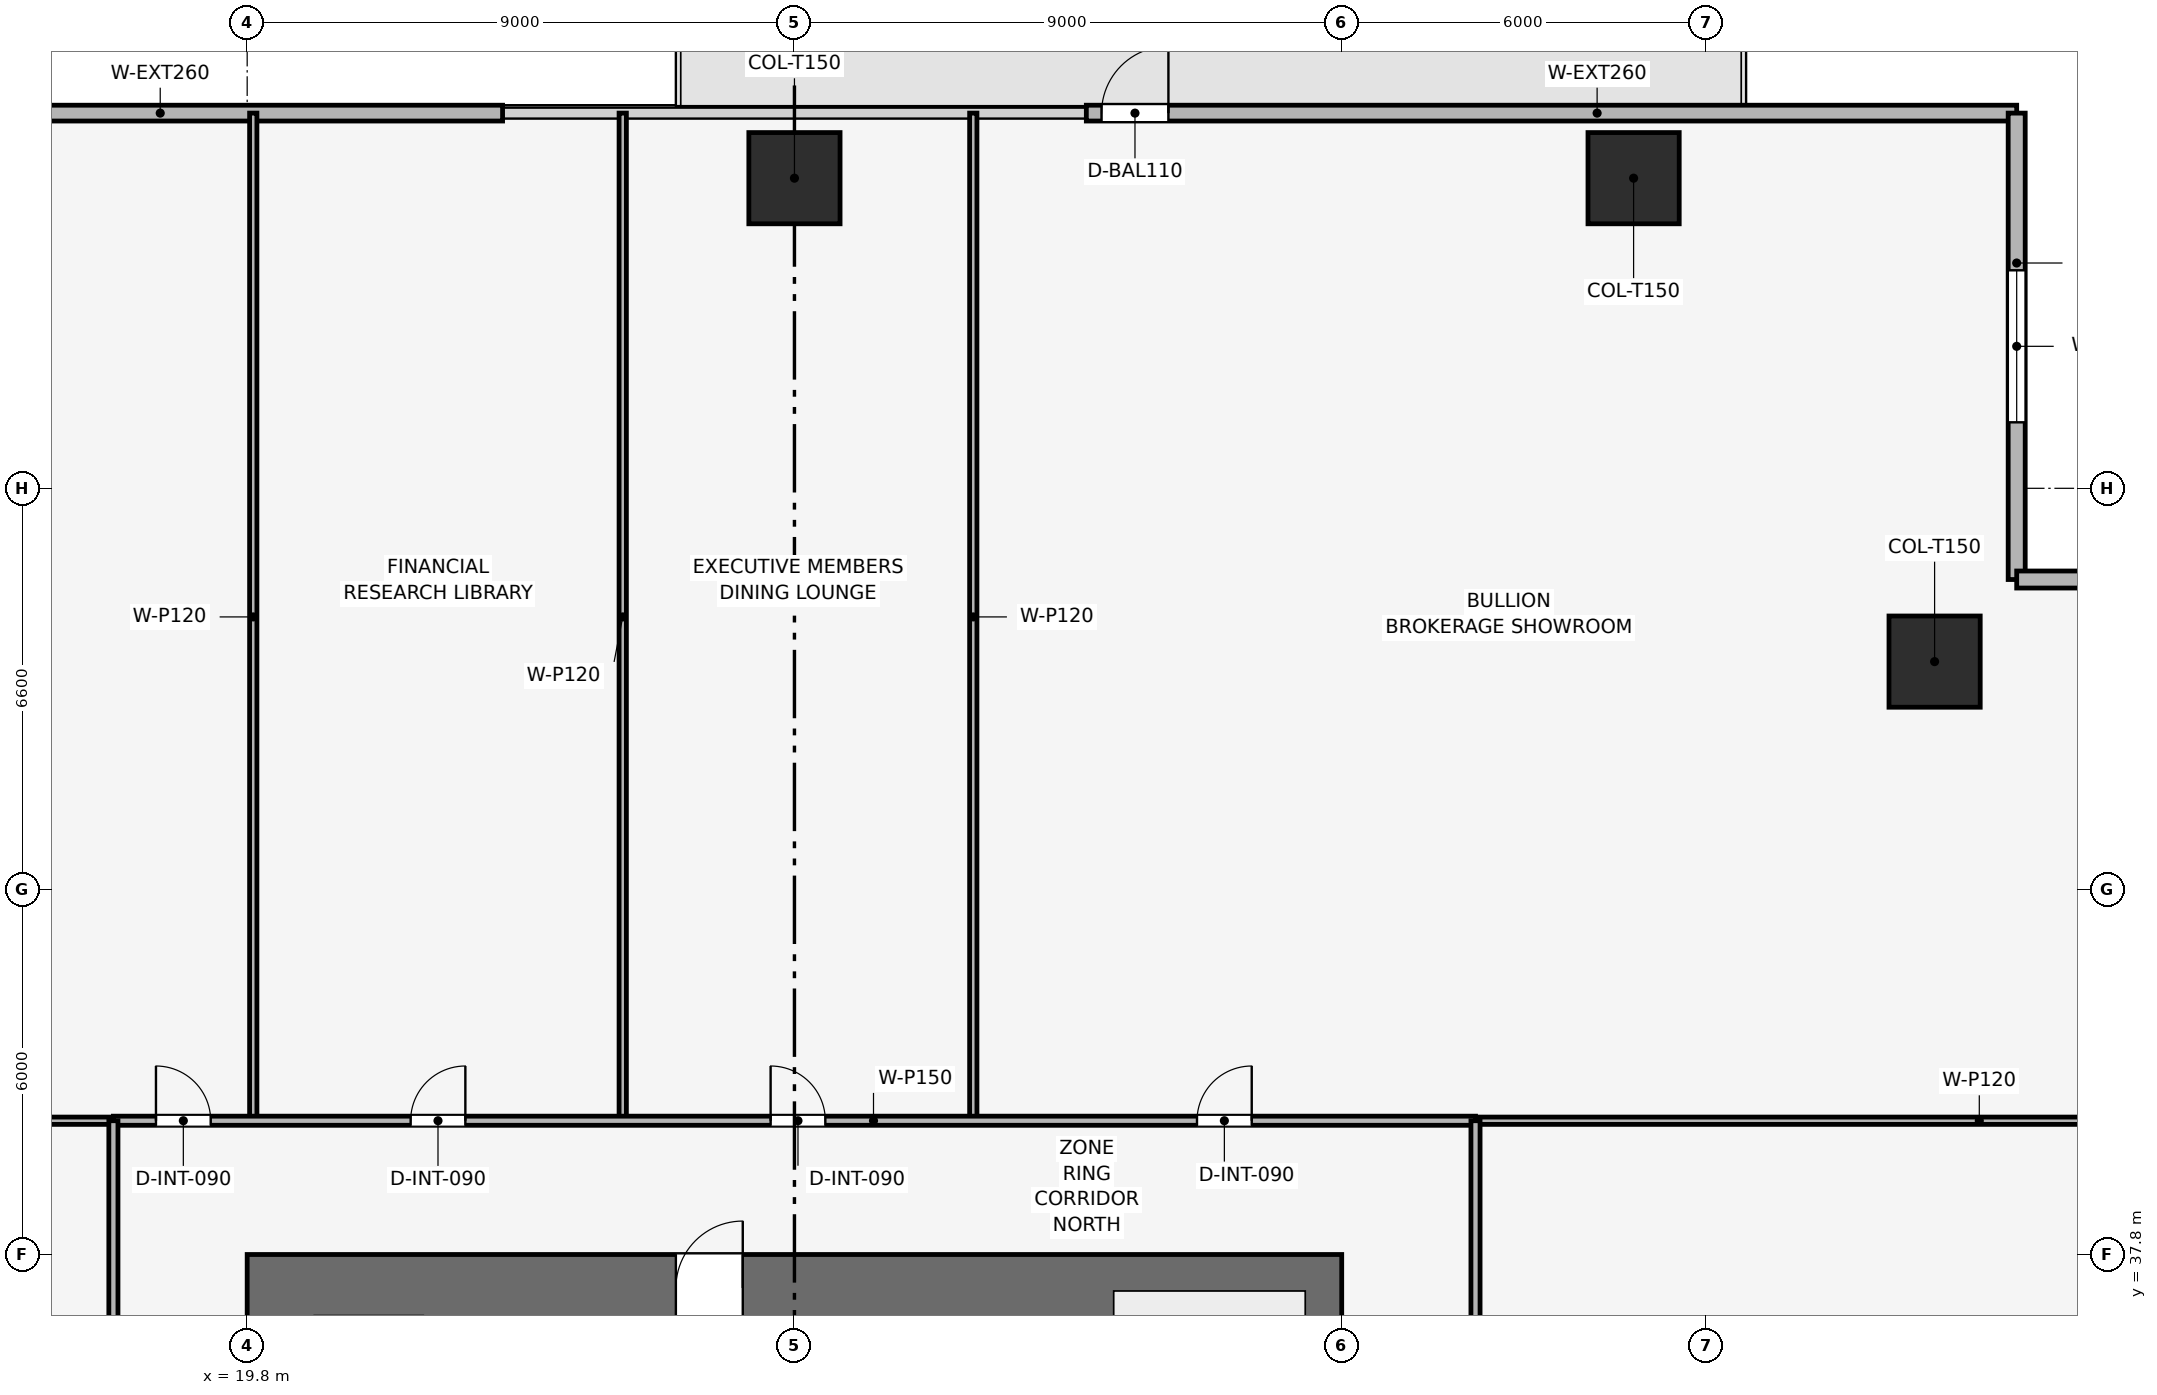
"""IFC4 building model, lengths in metres.
Left out: names, types, materials, properties, quantities, classifications, styles, units other than length and angle.
Written with IfcOpenShell. Run it as: python <this file> out.ifc"""

import sys

from ifc_helpers import new_model, si_unit, direction, frame, frame_2d, origin, origin_2d, place, context, subcontext, project, spatial, rectangle, extrude, element, fill, save


model = new_model("IFC4")
c1 = context("Model", 3, precision=1e-05, world=origin(), true_north=direction((0.0, 1.0)))
c2 = subcontext(c1, "Body", "Model", "MODEL_VIEW")
j1 = project(units=[si_unit("LENGTHUNIT", "METRE"), si_unit("PLANEANGLEUNIT", "RADIAN")], contexts=[c1])
p1 = place(None, origin())
s1 = spatial("IfcSite", under=j1, at=p1, CompositionType="ELEMENT")
p2 = place(p1, origin())
s2 = spatial("IfcBuilding", under=s1, at=p2, CompositionType="ELEMENT")
p3 = place(p2, frame((0.0, 0.0, 88.5)))
s3 = spatial("IfcBuildingStorey", under=s2, at=p3, CompositionType="ELEMENT", Elevation=88.5)
p4 = place(p3, frame((19.8, 37.25, 0.0), z_axis=(0.0, 0.0, 1.0), x_axis=(1.0, 0.0, 0.0)))
e1 = element("IfcWall", 1, at=p4, inside=s3, PredefinedType="SHEAR", context=c2, shape_type="SweptSolid", body=[
    extrude(rectangle(XDim=18.0, YDim=1.1, at=frame_2d((9.0, 0.0))), origin(), (0.0, 0.0, 1.0), 3.9),
])
p5 = place(p4, frame((7.05, 0.0, 0.0)))
e2 = element("IfcOpeningElement", 2, at=p5, cuts=e1, PredefinedType="OPENING", context=c2, shape_type="SweptSolid", body=[
    extrude(rectangle(XDim=1.1, YDim=2.15, at=frame_2d((0.55, 1.075))), frame((0.0, 0.56, 0.0), z_axis=(0.0, -1.0, 0.0), x_axis=(1.0, 0.0, 0.0)), (0.0, 0.0, 1.0), 1.12),
])
for number, where, z_axis, x_axis in (
    (3, (42.6, 55.5, 0.003), (0.0, 0.0, 1.0), (1.0, 0.0, 0.0)),
    (4, (28.8, 55.5, 0.003), (0.0, 0.0, 1.0), (1.0, 0.0, 0.0)),
    (5, (47.55, 47.55, 0.003), (0.0, 0.0, 1.0), (1.0, 0.0, 0.0)),
):
    element("IfcColumn", number, at=place(p3, frame(where, z_axis=z_axis, x_axis=x_axis)), inside=s3, PredefinedType="COLUMN", context=c2, shape_type="SweptSolid", body=[
        extrude(rectangle(XDim=1.5, YDim=1.5, at=origin_2d()), origin(), (0.0, 0.0, 1.0), 3.644),
    ])
p6 = place(p3, frame((8.7, 56.57, 0.0), z_axis=(0.0, 0.0, 1.0), x_axis=(1.0, 0.0, 0.0)))
e6 = element("IfcWall", 6, at=p6, inside=s3, PredefinedType="SOLIDWALL", context=c2, shape_type="SweptSolid", body=[
    extrude(rectangle(XDim=15.3, YDim=0.26, at=frame_2d((7.65, 0.0))), origin(), (0.0, 0.0, 1.0), 3.65),
])
p7 = place(p6, frame((0.25, 0.0, 0.9)))
e7 = element("IfcOpeningElement", 7, at=p7, cuts=e6, PredefinedType="OPENING", context=c2, shape_type="SweptSolid", body=[
    extrude(rectangle(XDim=3.8, YDim=1.9, at=frame_2d((1.9, 0.95))), frame((0.0, 0.14, 0.0), z_axis=(0.0, -1.0, 0.0), x_axis=(1.0, 0.0, 0.0)), (0.0, 0.0, 1.0), 0.28),
])
p8 = place(p3, frame((33.6, 56.57, 0.0), z_axis=(0.0, 0.0, 1.0), x_axis=(1.0, 0.0, 0.0)))
e8 = element("IfcWall", 8, at=p8, inside=s3, PredefinedType="SOLIDWALL", context=c2, shape_type="SweptSolid", body=[
    extrude(rectangle(XDim=15.3, YDim=0.26, at=frame_2d((7.65, 0.0))), origin(), (0.0, 0.0, 1.0), 3.65),
])
p9 = place(p8, frame((0.25, 0.0, 0.0)))
e9 = element("IfcOpeningElement", 9, at=p9, cuts=e8, PredefinedType="OPENING", context=c2, shape_type="SweptSolid", body=[
    extrude(rectangle(XDim=1.1, YDim=2.2, at=frame_2d((0.55, 1.1))), frame((0.0, 0.14, 0.0), z_axis=(0.0, -1.0, 0.0), x_axis=(1.0, 0.0, 0.0)), (0.0, 0.0, 1.0), 0.28),
])
p10 = place(p3, frame((48.9, 56.57, 0.0), z_axis=(0.0, 0.0, 1.0), x_axis=(0.0, -1.0, 0.0)))
e10 = element("IfcWall", 10, at=p10, inside=s3, PredefinedType="SOLIDWALL", context=c2, shape_type="SweptSolid", body=[
    extrude(rectangle(XDim=7.67, YDim=0.28, at=frame_2d((3.835, 0.0))), origin(), (0.0, 0.0, 1.0), 3.65),
])
p11 = place(p10, frame((2.585, 0.0, 0.9)))
e11 = element("IfcOpeningElement", 11, at=p11, cuts=e10, PredefinedType="OPENING", context=c2, shape_type="SweptSolid", body=[
    extrude(rectangle(XDim=2.5, YDim=1.9, at=frame_2d((1.25, 0.95))), frame((0.0, 0.15, 0.0), z_axis=(0.0, -1.0, 0.0), x_axis=(1.0, 0.0, 0.0)), (0.0, 0.0, 1.0), 0.3),
])
p12 = place(p3, frame((48.9, 48.9, 0.0), z_axis=(0.0, 0.0, 1.0), x_axis=(1.0, 0.0, 0.0)))
e12 = element("IfcWall", 12, at=p12, inside=s3, PredefinedType="SOLIDWALL", context=c2, shape_type="SweptSolid", body=[
    extrude(rectangle(XDim=7.67, YDim=0.28, at=frame_2d((3.835, 0.0))), origin(), (0.0, 0.0, 1.0), 3.65),
])
p13 = place(p12, frame((2.585, 0.0, 0.9)))
e13 = element("IfcOpeningElement", 13, at=p13, cuts=e12, PredefinedType="OPENING", context=c2, shape_type="SweptSolid", body=[
    extrude(rectangle(XDim=2.5, YDim=1.9, at=frame_2d((1.25, 0.95))), frame((0.0, 0.15, 0.0), z_axis=(0.0, -1.0, 0.0), x_axis=(1.0, 0.0, 0.0)), (0.0, 0.0, 1.0), 0.3),
])
for number, where, z_axis, x_axis in (
    (14, (19.9, 40.0, 0.0), (0.0, 0.0, 1.0), (0.0, 1.0, 0.0)),
    (15, (25.976, 40.0, 0.0), (0.0, 0.0, 1.0), (0.0, 1.0, 0.0)),
    (16, (31.741, 40.0, 0.0), (0.0, 0.0, 1.0), (0.0, 1.0, 0.0)),
    (17, (1.03, 40.0, 0.0), (0.0, 0.0, 1.0), (1.0, 0.0, 0.0)),
    (18, (40.0, 40.0, 0.0), (0.0, 0.0, 1.0), (1.0, 0.0, 0.0)),
):
    element("IfcWall", number, at=place(p3, frame(where, z_axis=z_axis, x_axis=x_axis)), inside=s3, PredefinedType="PARTITIONING", context=c2, shape_type="SweptSolid", body=[
        extrude(rectangle(XDim=16.57, YDim=0.12, at=frame_2d((8.285, 0.0))), origin(), (0.0, 0.0, 1.0), 2.935),
    ])
p14 = place(p3, frame((17.6, 40.0, 0.0), z_axis=(0.0, 0.0, 1.0), x_axis=(1.0, 0.0, 0.0)))
e19 = element("IfcWall", 19, at=p14, inside=s3, PredefinedType="PARTITIONING", context=c2, shape_type="SweptSolid", body=[
    extrude(rectangle(XDim=22.4, YDim=0.15, at=frame_2d((11.2, 0.0))), origin(), (0.0, 0.0, 1.0), 3.085),
])
p15 = place(p14, frame((0.7, 0.0, 0.0)))
e20 = element("IfcOpeningElement", 20, at=p15, cuts=e19, PredefinedType="OPENING", context=c2, shape_type="SweptSolid", body=[
    extrude(rectangle(XDim=0.9, YDim=2.1, at=frame_2d((0.45, 1.05))), frame((0.0, 0.085, 0.0), z_axis=(0.0, -1.0, 0.0), x_axis=(1.0, 0.0, 0.0)), (0.0, 0.0, 1.0), 0.17),
])
p16 = place(p14, frame((4.888, 0.0, 0.0)))
e21 = element("IfcOpeningElement", 21, at=p16, cuts=e19, PredefinedType="OPENING", context=c2, shape_type="SweptSolid", body=[
    extrude(rectangle(XDim=0.9, YDim=2.1, at=frame_2d((0.45, 1.05))), frame((0.0, 0.085, 0.0), z_axis=(0.0, -1.0, 0.0), x_axis=(1.0, 0.0, 0.0)), (0.0, 0.0, 1.0), 0.17),
])
p17 = place(p14, frame((10.808, 0.0, 0.0)))
e22 = element("IfcOpeningElement", 22, at=p17, cuts=e19, PredefinedType="OPENING", context=c2, shape_type="SweptSolid", body=[
    extrude(rectangle(XDim=0.9, YDim=2.1, at=frame_2d((0.45, 1.05))), frame((0.0, 0.085, 0.0), z_axis=(0.0, -1.0, 0.0), x_axis=(1.0, 0.0, 0.0)), (0.0, 0.0, 1.0), 0.17),
])
p18 = place(p14, frame((17.82, 0.0, 0.0)))
e23 = element("IfcOpeningElement", 23, at=p18, cuts=e19, PredefinedType="OPENING", context=c2, shape_type="SweptSolid", body=[
    extrude(rectangle(XDim=0.9, YDim=2.1, at=frame_2d((0.45, 1.05))), frame((0.0, 0.085, 0.0), z_axis=(0.0, -1.0, 0.0), x_axis=(1.0, 0.0, 0.0)), (0.0, 0.0, 1.0), 0.17),
])
p19 = place(p3, frame((17.6, 17.6, 0.0), z_axis=(0.0, 0.0, 1.0), x_axis=(0.0, 1.0, 0.0)))
e24 = element("IfcWall", 24, at=p19, inside=s3, PredefinedType="PARTITIONING", context=c2, shape_type="SweptSolid", body=[
    extrude(rectangle(XDim=22.4, YDim=0.15, at=frame_2d((11.2, 0.0))), origin(), (0.0, 0.0, 1.0), 3.085),
])
p20 = place(p19, frame((2.48, 0.0, 0.0)))
e25 = element("IfcOpeningElement", 25, at=p20, cuts=e24, PredefinedType="OPENING", context=c2, shape_type="SweptSolid", body=[
    extrude(rectangle(XDim=0.9, YDim=2.1, at=frame_2d((0.45, 1.05))), frame((0.0, 0.085, 0.0), z_axis=(0.0, -1.0, 0.0), x_axis=(1.0, 0.0, 0.0)), (0.0, 0.0, 1.0), 0.17),
])
p21 = place(p19, frame((13.68, 0.0, 0.0)))
e26 = element("IfcOpeningElement", 26, at=p21, cuts=e24, PredefinedType="OPENING", context=c2, shape_type="SweptSolid", body=[
    extrude(rectangle(XDim=0.9, YDim=2.1, at=frame_2d((0.45, 1.05))), frame((0.0, 0.085, 0.0), z_axis=(0.0, -1.0, 0.0), x_axis=(1.0, 0.0, 0.0)), (0.0, 0.0, 1.0), 0.17),
])
p22 = place(p3, frame((40.0, 17.6, 0.0), z_axis=(0.0, 0.0, 1.0), x_axis=(0.0, 1.0, 0.0)))
e27 = element("IfcWall", 27, at=p22, inside=s3, PredefinedType="PARTITIONING", context=c2, shape_type="SweptSolid", body=[
    extrude(rectangle(XDim=22.4, YDim=0.15, at=frame_2d((11.2, 0.0))), origin(), (0.0, 0.0, 1.0), 3.085),
])
p23 = place(p22, frame((0.85, 0.0, 0.0)))
e28 = element("IfcOpeningElement", 28, at=p23, cuts=e27, PredefinedType="OPENING", context=c2, shape_type="SweptSolid", body=[
    extrude(rectangle(XDim=0.9, YDim=2.1, at=frame_2d((0.45, 1.05))), frame((0.0, 0.085, 0.0), z_axis=(0.0, -1.0, 0.0), x_axis=(1.0, 0.0, 0.0)), (0.0, 0.0, 1.0), 0.17),
])
p24 = place(p22, frame((3.55, 0.0, 0.0)))
e29 = element("IfcOpeningElement", 29, at=p24, cuts=e27, PredefinedType="OPENING", context=c2, shape_type="SweptSolid", body=[
    extrude(rectangle(XDim=0.9, YDim=2.1, at=frame_2d((0.45, 1.05))), frame((0.0, 0.085, 0.0), z_axis=(0.0, -1.0, 0.0), x_axis=(1.0, 0.0, 0.0)), (0.0, 0.0, 1.0), 0.17),
])
p25 = place(p22, frame((6.45, 0.0, 0.0)))
e30 = element("IfcOpeningElement", 30, at=p25, cuts=e27, PredefinedType="OPENING", context=c2, shape_type="SweptSolid", body=[
    extrude(rectangle(XDim=0.9, YDim=2.1, at=frame_2d((0.45, 1.05))), frame((0.0, 0.085, 0.0), z_axis=(0.0, -1.0, 0.0), x_axis=(1.0, 0.0, 0.0)), (0.0, 0.0, 1.0), 0.17),
])
p26 = place(p22, frame((9.2, 0.0, 0.0)))
e31 = element("IfcOpeningElement", 31, at=p26, cuts=e27, PredefinedType="OPENING", context=c2, shape_type="SweptSolid", body=[
    extrude(rectangle(XDim=0.95, YDim=2.1, at=frame_2d((0.475, 1.05))), frame((0.0, 0.085, 0.0), z_axis=(0.0, -1.0, 0.0), x_axis=(1.0, 0.0, 0.0)), (0.0, 0.0, 1.0), 0.17),
])
p27 = place(p22, frame((16.25, 0.0, 0.0)))
e32 = element("IfcOpeningElement", 32, at=p27, cuts=e27, PredefinedType="OPENING", context=c2, shape_type="SweptSolid", body=[
    extrude(rectangle(XDim=0.9, YDim=2.1, at=frame_2d((0.45, 1.05))), frame((0.0, 0.085, 0.0), z_axis=(0.0, -1.0, 0.0), x_axis=(1.0, 0.0, 0.0)), (0.0, 0.0, 1.0), 0.17),
])
p28 = place(p9, origin())
e33 = element("IfcDoor", 33, at=p28, inside=s3, OperationType="SINGLE_SWING_RIGHT", PredefinedType="DOOR", context=c2, shape_type="SweptSolid", body=[
    extrude(rectangle(XDim=1.1, YDim=2.2, at=frame_2d((0.55, 1.1))), frame((0.0, 0.025, 0.0), z_axis=(0.0, -1.0, 0.0), x_axis=(1.0, 0.0, 0.0)), (0.0, 0.0, 1.0), 0.05),
])
fill(e9, e33)
p29 = place(p11, origin())
e34 = element("IfcWindow", 34, at=p29, inside=s3, PartitioningType="SINGLE_PANEL", PredefinedType="WINDOW", context=c2, shape_type="SweptSolid", body=[
    extrude(rectangle(XDim=2.5, YDim=1.9, at=frame_2d((1.25, 0.95))), frame((0.0, 0.03, 0.0), z_axis=(0.0, -1.0, 0.0), x_axis=(1.0, 0.0, 0.0)), (0.0, 0.0, 1.0), 0.06),
])
fill(e11, e34)
p30 = place(p15, origin())
e35 = element("IfcDoor", 35, at=p30, inside=s3, OperationType="SINGLE_SWING_LEFT", PredefinedType="DOOR", context=c2, shape_type="SweptSolid", body=[
    extrude(rectangle(XDim=0.9, YDim=2.1, at=frame_2d((0.45, 1.05))), frame((0.0, 0.025, 0.0), z_axis=(0.0, -1.0, 0.0), x_axis=(1.0, 0.0, 0.0)), (0.0, 0.0, 1.0), 0.05),
])
fill(e20, e35)
p31 = place(p16, origin())
e36 = element("IfcDoor", 36, at=p31, inside=s3, OperationType="SINGLE_SWING_RIGHT", PredefinedType="DOOR", context=c2, shape_type="SweptSolid", body=[
    extrude(rectangle(XDim=0.9, YDim=2.1, at=frame_2d((0.45, 1.05))), frame((0.0, 0.025, 0.0), z_axis=(0.0, -1.0, 0.0), x_axis=(1.0, 0.0, 0.0)), (0.0, 0.0, 1.0), 0.05),
])
fill(e21, e36)
p32 = place(p17, origin())
e37 = element("IfcDoor", 37, at=p32, inside=s3, OperationType="SINGLE_SWING_LEFT", PredefinedType="DOOR", context=c2, shape_type="SweptSolid", body=[
    extrude(rectangle(XDim=0.9, YDim=2.1, at=frame_2d((0.45, 1.05))), frame((0.0, 0.025, 0.0), z_axis=(0.0, -1.0, 0.0), x_axis=(1.0, 0.0, 0.0)), (0.0, 0.0, 1.0), 0.05),
])
fill(e22, e37)
p33 = place(p18, origin())
e38 = element("IfcDoor", 38, at=p33, inside=s3, OperationType="SINGLE_SWING_RIGHT", PredefinedType="DOOR", context=c2, shape_type="SweptSolid", body=[
    extrude(rectangle(XDim=0.9, YDim=2.1, at=frame_2d((0.45, 1.05))), frame((0.0, 0.025, 0.0), z_axis=(0.0, -1.0, 0.0), x_axis=(1.0, 0.0, 0.0)), (0.0, 0.0, 1.0), 0.05),
])
fill(e23, e38)
p34 = place(p5, origin())
e39 = element("IfcDoor", 39, at=p34, inside=s3, OperationType="SINGLE_SWING_RIGHT", PredefinedType="DOOR", context=c2, shape_type="SweptSolid", body=[
    extrude(rectangle(XDim=1.1, YDim=2.15, at=frame_2d((0.55, 1.075))), frame((0.0, 0.025, 0.0), z_axis=(0.0, -1.0, 0.0), x_axis=(1.0, 0.0, 0.0)), (0.0, 0.0, 1.0), 0.05),
])
fill(e2, e39)
save(model, sys.argv[1])
